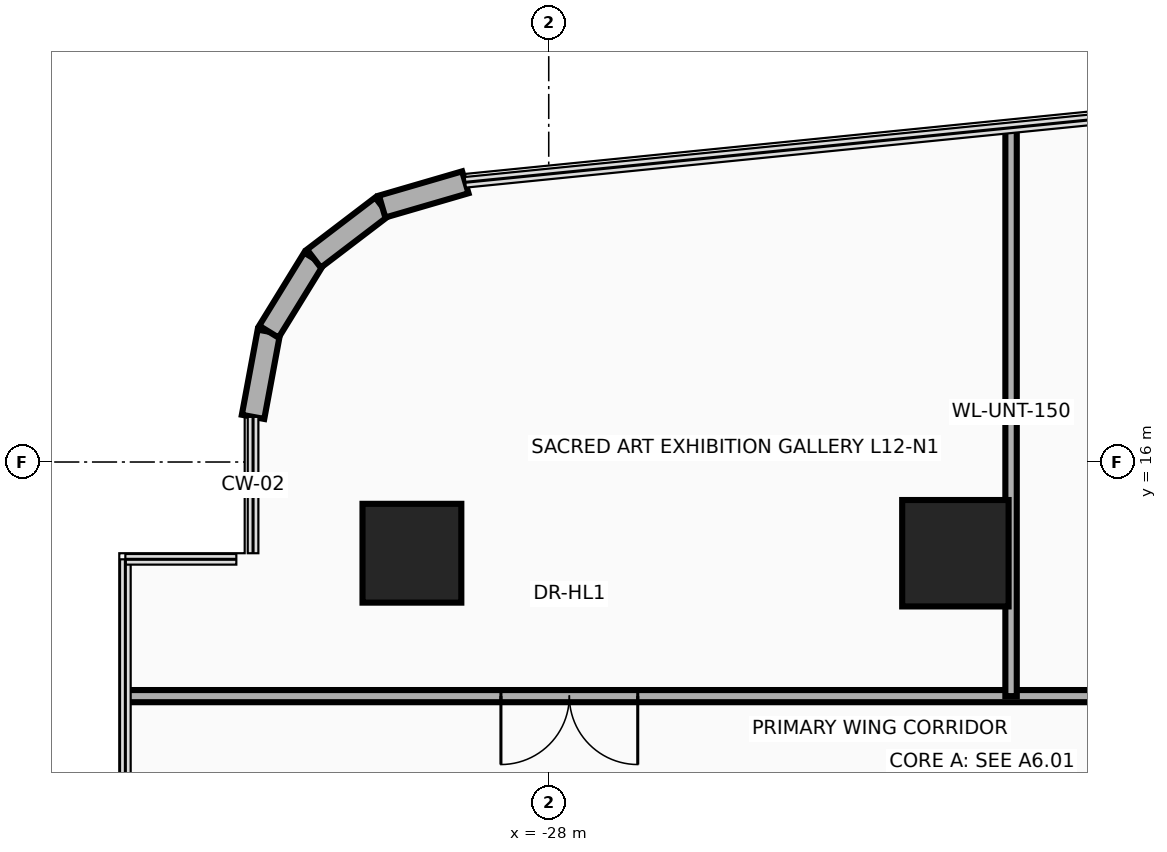
"""IFC4 building model, lengths in metres.
Left out: names, types, materials, properties, quantities, classifications, styles, units other than length and angle.
Written with IfcOpenShell. Run it as: python <this file> out.ifc"""

import sys

from ifc_helpers import new_model, si_unit, direction, frame, frame_2d, origin, origin_2d, place, context, subcontext, project, spatial, rectangle, circle, extrude, source, transform, mapped, element, fill, save


model = new_model("IFC4")
c1 = context("Model", 3, precision=1e-05, world=origin(), true_north=direction((0.0, 1.0)))
c2 = subcontext(c1, "Body", "Model", "MODEL_VIEW")
j1 = project(units=[si_unit("LENGTHUNIT", "METRE"), si_unit("PLANEANGLEUNIT", "RADIAN")], contexts=[c1])
p1 = place(None, origin())
s1 = spatial("IfcSite", under=j1, at=p1, CompositionType="ELEMENT")
p2 = place(p1, origin())
s2 = spatial("IfcBuilding", under=s1, at=p2, CompositionType="ELEMENT")
p3 = place(p2, frame((0.0, 0.0, 51.9)))
s3 = spatial("IfcBuildingStorey", under=s2, at=p3, CompositionType="ELEMENT", Elevation=51.9)
m1 = source(origin(), c2, "Body", "SweptSolid", [
    extrude(circle(Radius=0.65, at=origin_2d()), origin(), (0.0, 0.0, 1.0), 3.7),
])
p4 = place(p3, frame((-29.8, 14.8, 0.0), z_axis=(0.0, 0.0, 1.0), x_axis=(1.0, 0.0, 0.0)))
e1 = element("IfcColumn", 1, at=p4, inside=s3, PredefinedType="COLUMN", context=c2, shape_type="MappedRepresentation", body=[
    mapped(m1, transform((0.0, 0.0, 0.0), x_axis=(1.0, 0.0, 0.0), y_axis=(0.0, 1.0, 0.0), z_axis=(0.0, 0.0, 1.0), scale=1.0)),
])
m2 = source(origin(), c2, "Body", "SweptSolid", [
    extrude(rectangle(XDim=1.4, YDim=1.4, at=origin_2d()), origin(), (0.0, 0.0, 1.0), 3.7),
])
p5 = place(p3, frame((-22.65, 14.8, 0.0), z_axis=(0.0, 0.0, 1.0), x_axis=(1.0, 0.0, 0.0)))
e2 = element("IfcColumn", 2, at=p5, inside=s3, PredefinedType="COLUMN", context=c2, shape_type="MappedRepresentation", body=[
    mapped(m2, transform((0.0, 0.0, 0.0), x_axis=(1.0, 0.0, 0.0), y_axis=(0.0, 1.0, 0.0), z_axis=(0.0, 0.0, 1.0), scale=1.0)),
])
p6 = place(p3, frame((-31.89, 16.594, 0.0), z_axis=(0.0, 0.0, 1.0), x_axis=(0.182748995683, 0.9831596028, 0.0)))
e3 = element("IfcWall", 3, at=p6, inside=s3, PredefinedType="SOLIDWALL", context=c2, shape_type="SweptSolid", body=[
    extrude(rectangle(XDim=1.14, YDim=0.3, at=frame_2d((0.57, 0.0))), origin(), (0.0, 0.0, 1.0), 3.46),
])
p7 = place(p3, frame((-31.682, 17.714, 0.0), z_axis=(0.0, 0.0, 1.0), x_axis=(0.524157723014, 0.8516212077, 0.0)))
e4 = element("IfcWall", 4, at=p7, inside=s3, PredefinedType="SOLIDWALL", context=c2, shape_type="SweptSolid", body=[
    extrude(rectangle(XDim=1.129, YDim=0.3, at=frame_2d((0.565, 0.0))), origin(), (0.0, 0.0, 1.0), 3.46),
])
p8 = place(p3, frame((-31.09, 18.676, 0.0), z_axis=(0.0, 0.0, 1.0), x_axis=(0.795253002434, 0.606277710393, 0.0)))
e5 = element("IfcWall", 5, at=p8, inside=s3, PredefinedType="SOLIDWALL", context=c2, shape_type="SweptSolid", body=[
    extrude(rectangle(XDim=1.129, YDim=0.3, at=frame_2d((0.564, 0.0))), origin(), (0.0, 0.0, 1.0), 3.46),
])
p9 = place(p3, frame((-30.192, 19.361, 0.0), z_axis=(0.0, 0.0, 1.0), x_axis=(0.960071941549, 0.279753225271, 0.0)))
e6 = element("IfcWall", 6, at=p9, inside=s3, PredefinedType="SOLIDWALL", context=c2, shape_type="SweptSolid", body=[
    extrude(rectangle(XDim=1.14, YDim=0.3, at=frame_2d((0.57, 0.0))), origin(), (0.0, 0.0, 1.0), 3.46),
])
p10 = place(p3, frame((-33.54, 12.92, 0.0), z_axis=(0.0, 0.0, 1.0), x_axis=(1.0, 0.0, 0.0)))
e7 = element("IfcWall", 7, at=p10, inside=s3, PredefinedType="PARTITIONING", context=c2, shape_type="SweptSolid", body=[
    extrude(rectangle(XDim=47.09, YDim=0.16, at=frame_2d((23.545, 0.0))), origin(), (0.0, 0.0, 1.0), 2.583),
])
p11 = place(p10, frame((4.911, 0.0, 0.0)))
e8 = element("IfcOpeningElement", 8, at=p11, cuts=e7, PredefinedType="OPENING", context=c2, shape_type="SweptSolid", body=[
    extrude(rectangle(XDim=1.8, YDim=2.15, at=frame_2d((0.9, 1.075))), frame((0.0, 0.095, 0.0), z_axis=(0.0, -1.0, 0.0), x_axis=(1.0, 0.0, 0.0)), (0.0, 0.0, 1.0), 0.19),
])
p12 = place(p10, frame((16.634, 0.0, 0.0)))
e9 = element("IfcOpeningElement", 9, at=p12, cuts=e7, PredefinedType="OPENING", context=c2, shape_type="SweptSolid", body=[
    extrude(rectangle(XDim=1.8, YDim=2.15, at=frame_2d((0.9, 1.075))), frame((0.0, 0.095, 0.0), z_axis=(0.0, -1.0, 0.0), x_axis=(1.0, 0.0, 0.0)), (0.0, 0.0, 1.0), 0.19),
])
p13 = place(p10, frame((27.285, 0.0, 0.0)))
e10 = element("IfcOpeningElement", 10, at=p13, cuts=e7, PredefinedType="OPENING", context=c2, shape_type="SweptSolid", body=[
    extrude(rectangle(XDim=1.8, YDim=2.15, at=frame_2d((0.9, 1.075))), frame((0.0, 0.095, 0.0), z_axis=(0.0, -1.0, 0.0), x_axis=(1.0, 0.0, 0.0)), (0.0, 0.0, 1.0), 0.19),
])
p14 = place(p10, frame((40.279, 0.0, 0.0)))
e11 = element("IfcOpeningElement", 11, at=p14, cuts=e7, PredefinedType="OPENING", context=c2, shape_type="SweptSolid", body=[
    extrude(rectangle(XDim=1.8, YDim=2.15, at=frame_2d((0.9, 1.075))), frame((0.0, 0.095, 0.0), z_axis=(0.0, -1.0, 0.0), x_axis=(1.0, 0.0, 0.0)), (0.0, 0.0, 1.0), 0.19),
])
p15 = place(p3, frame((-21.917, 12.92, 0.0), z_axis=(0.0, 0.0, 1.0), x_axis=(0.0, 1.0, 0.0)))
e12 = element("IfcWall", 12, at=p15, inside=s3, PredefinedType="PARTITIONING", context=c2, shape_type="SweptSolid", body=[
    extrude(rectangle(XDim=7.478, YDim=0.15, at=frame_2d((3.739, 0.0))), origin(), (0.0, 0.0, 1.0), 2.583),
])
p16 = place(p11, frame((1.8, 0.0, 0.0), z_axis=(0.0, 0.0, 1.0), x_axis=(-1.0, 0.0, 0.0)))
e13 = element("IfcDoor", 13, at=p16, inside=s3, OperationType="DOUBLE_DOOR_SINGLE_SWING", PredefinedType="DOOR", context=c2, shape_type="SweptSolid", body=[
    extrude(rectangle(XDim=1.8, YDim=2.15, at=frame_2d((0.9, 1.075))), frame((0.0, 0.025, 0.0), z_axis=(0.0, -1.0, 0.0), x_axis=(1.0, 0.0, 0.0)), (0.0, 0.0, 1.0), 0.05),
])
fill(e8, e13)
save(model, sys.argv[1])
